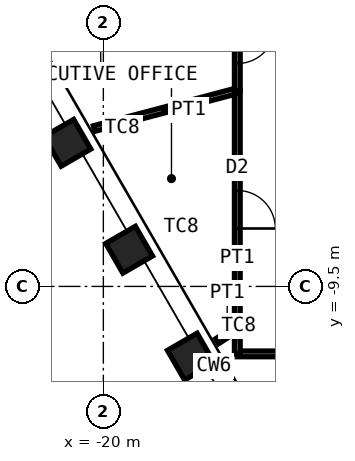
"""IFC4 building model, lengths in metres.
Left out: names, types, materials, properties, quantities, classifications, styles, units other than length and angle.
Written with IfcOpenShell. Run it as: python <this file> out.ifc"""

import sys

from ifc_helpers import new_model, si_unit, direction, frame, frame_2d, origin, origin_2d, place, context, subcontext, project, spatial, rectangle, hollow_rectangle, extrude, element, fill, save


model = new_model("IFC4")
c1 = context("Model", 3, precision=1e-05, world=origin(), true_north=direction((0.0, 1.0)))
c2 = subcontext(c1, "Body", "Model", "MODEL_VIEW")
j1 = project(units=[si_unit("LENGTHUNIT", "METRE"), si_unit("PLANEANGLEUNIT", "RADIAN")], contexts=[c1])
p1 = place(None, origin())
s1 = spatial("IfcSite", under=j1, at=p1, CompositionType="ELEMENT")
p2 = place(p1, origin())
s2 = spatial("IfcBuilding", under=s1, at=p2, CompositionType="ELEMENT")
p3 = place(p2, frame((0.0, 0.0, 325.0)))
s3 = spatial("IfcBuildingStorey", under=s2, at=p3, CompositionType="ELEMENT", Elevation=325.0)
for number, where, z_axis, x_axis in (
    (1, (-17.698, -11.347, 0.0), (0.0, 0.0, 1.0), (0.5, -0.866, 0.0)),
    (2, (-19.322, -8.534, 0.0), (0.0, 0.0, 1.0), (0.5, -0.866, 0.0)),
    (3, (-20.946, -5.721, 0.0), (0.0, 0.0, 1.0), (0.5, -0.866, 0.0)),
):
    element("IfcColumn", number, at=place(p3, frame(where, z_axis=z_axis, x_axis=x_axis)), inside=s3, PredefinedType="COLUMN", context=c2, shape_type="SweptSolid", body=[
        extrude(hollow_rectangle(XDim=0.9, YDim=0.9, WallThickness=0.05, at=origin_2d()), origin(), (0.0, 0.0, 1.0), 4.2),
    ])
p4 = place(p3, frame((-3.279, -11.275, 0.0), z_axis=(0.0, 0.0, 1.0), x_axis=(-1.0, 0.0, 0.0)))
e4 = element("IfcWall", 4, at=p4, inside=s3, PredefinedType="PARTITIONING", context=c2, shape_type="SweptSolid", body=[
    extrude(rectangle(XDim=13.197, YDim=0.15, at=frame_2d((6.598, 0.0))), origin(), (0.0, 0.0, 1.0), 4.03),
])
p5 = place(p4, frame((5.698, 0.0, 0.0)))
e5 = element("IfcOpeningElement", 5, at=p5, cuts=e4, PredefinedType="OPENING", context=c2, shape_type="SweptSolid", body=[
    extrude(rectangle(XDim=1.8, YDim=2.4, at=frame_2d((0.9, 1.2))), frame((0.0, 0.085, 0.0), z_axis=(0.0, -1.0, 0.0), x_axis=(1.0, 0.0, 0.0)), (0.0, 0.0, 1.0), 0.17),
])
p6 = place(p3, frame((-16.475, -11.275, 0.0), z_axis=(0.0, 0.0, 1.0), x_axis=(0.0, 1.0, 0.0)))
e6 = element("IfcWall", 6, at=p6, inside=s3, PredefinedType="PARTITIONING", context=c2, shape_type="SweptSolid", body=[
    extrude(rectangle(XDim=0.674, YDim=0.15, at=frame_2d((0.337, 0.0))), origin(), (0.0, 0.0, 1.0), 4.03),
])
p7 = place(p3, frame((-17.007, -10.943, 0.0), z_axis=(0.0, 0.0, 1.0), x_axis=(0.840789611822, 0.541362012568, 0.0)))
e7 = element("IfcWall", 7, at=p7, inside=s3, PredefinedType="PARTITIONING", context=c2, shape_type="SweptSolid", body=[
    extrude(rectangle(XDim=0.633, YDim=0.15, at=frame_2d((0.316, 0.0))), origin(), (0.0, 0.0, 1.0), 3.33),
])
p8 = place(p3, frame((-16.475, -10.601, 0.0), z_axis=(0.0, 0.0, 1.0), x_axis=(0.0, 1.0, 0.0)))
e8 = element("IfcWall", 8, at=p8, inside=s3, PredefinedType="PARTITIONING", context=c2, shape_type="SweptSolid", body=[
    extrude(rectangle(XDim=6.25, YDim=0.15, at=frame_2d((3.125, 0.0))), origin(), (0.0, 0.0, 1.0), 4.03),
])
p9 = place(p8, frame((2.625, 0.0, 0.0)))
e9 = element("IfcOpeningElement", 9, at=p9, cuts=e8, PredefinedType="OPENING", context=c2, shape_type="SweptSolid", body=[
    extrude(rectangle(XDim=1.0, YDim=2.4, at=frame_2d((0.5, 1.2))), frame((0.0, 0.085, 0.0), z_axis=(0.0, -1.0, 0.0), x_axis=(1.0, 0.0, 0.0)), (0.0, 0.0, 1.0), 0.17),
])
p10 = place(p3, frame((-20.243, -5.346, 0.0), z_axis=(0.0, 0.0, 1.0), x_axis=(0.966843659694, 0.25536902261, 0.0)))
e10 = element("IfcWall", 10, at=p10, inside=s3, PredefinedType="PARTITIONING", context=c2, shape_type="SweptSolid", body=[
    extrude(rectangle(XDim=3.897, YDim=0.15, at=frame_2d((1.948, 0.0))), origin(), (0.0, 0.0, 1.0), 3.33),
])
p11 = place(p3, frame((-16.475, -4.351, 0.0), z_axis=(0.0, 0.0, 1.0), x_axis=(0.0, 1.0, 0.0)))
e11 = element("IfcWall", 11, at=p11, inside=s3, PredefinedType="PARTITIONING", context=c2, shape_type="SweptSolid", body=[
    extrude(rectangle(XDim=2.432, YDim=0.15, at=frame_2d((1.216, 0.0))), origin(), (0.0, 0.0, 1.0), 4.03),
])
p12 = place(p11, frame((0.716, 0.0, 0.0)))
e12 = element("IfcOpeningElement", 12, at=p12, cuts=e11, PredefinedType="OPENING", context=c2, shape_type="SweptSolid", body=[
    extrude(rectangle(XDim=1.0, YDim=2.4, at=frame_2d((0.5, 1.2))), frame((0.0, 0.085, 0.0), z_axis=(0.0, -1.0, 0.0), x_axis=(1.0, 0.0, 0.0)), (0.0, 0.0, 1.0), 0.17),
])
p13 = place(p9, origin())
e13 = element("IfcDoor", 13, at=p13, inside=s3, OperationType="SINGLE_SWING_LEFT", PredefinedType="DOOR", context=c2, shape_type="SweptSolid", body=[
    extrude(rectangle(XDim=1.0, YDim=2.4, at=frame_2d((0.5, 1.2))), frame((0.0, 0.025, 0.0), z_axis=(0.0, -1.0, 0.0), x_axis=(1.0, 0.0, 0.0)), (0.0, 0.0, 1.0), 0.05),
])
fill(e9, e13)
p14 = place(p12, origin())
e14 = element("IfcDoor", 14, at=p14, inside=s3, OperationType="SINGLE_SWING_RIGHT", PredefinedType="DOOR", context=c2, shape_type="SweptSolid", body=[
    extrude(rectangle(XDim=1.0, YDim=2.4, at=frame_2d((0.5, 1.2))), frame((0.0, 0.025, 0.0), z_axis=(0.0, -1.0, 0.0), x_axis=(1.0, 0.0, 0.0)), (0.0, 0.0, 1.0), 0.05),
])
fill(e12, e14)
save(model, sys.argv[1])
